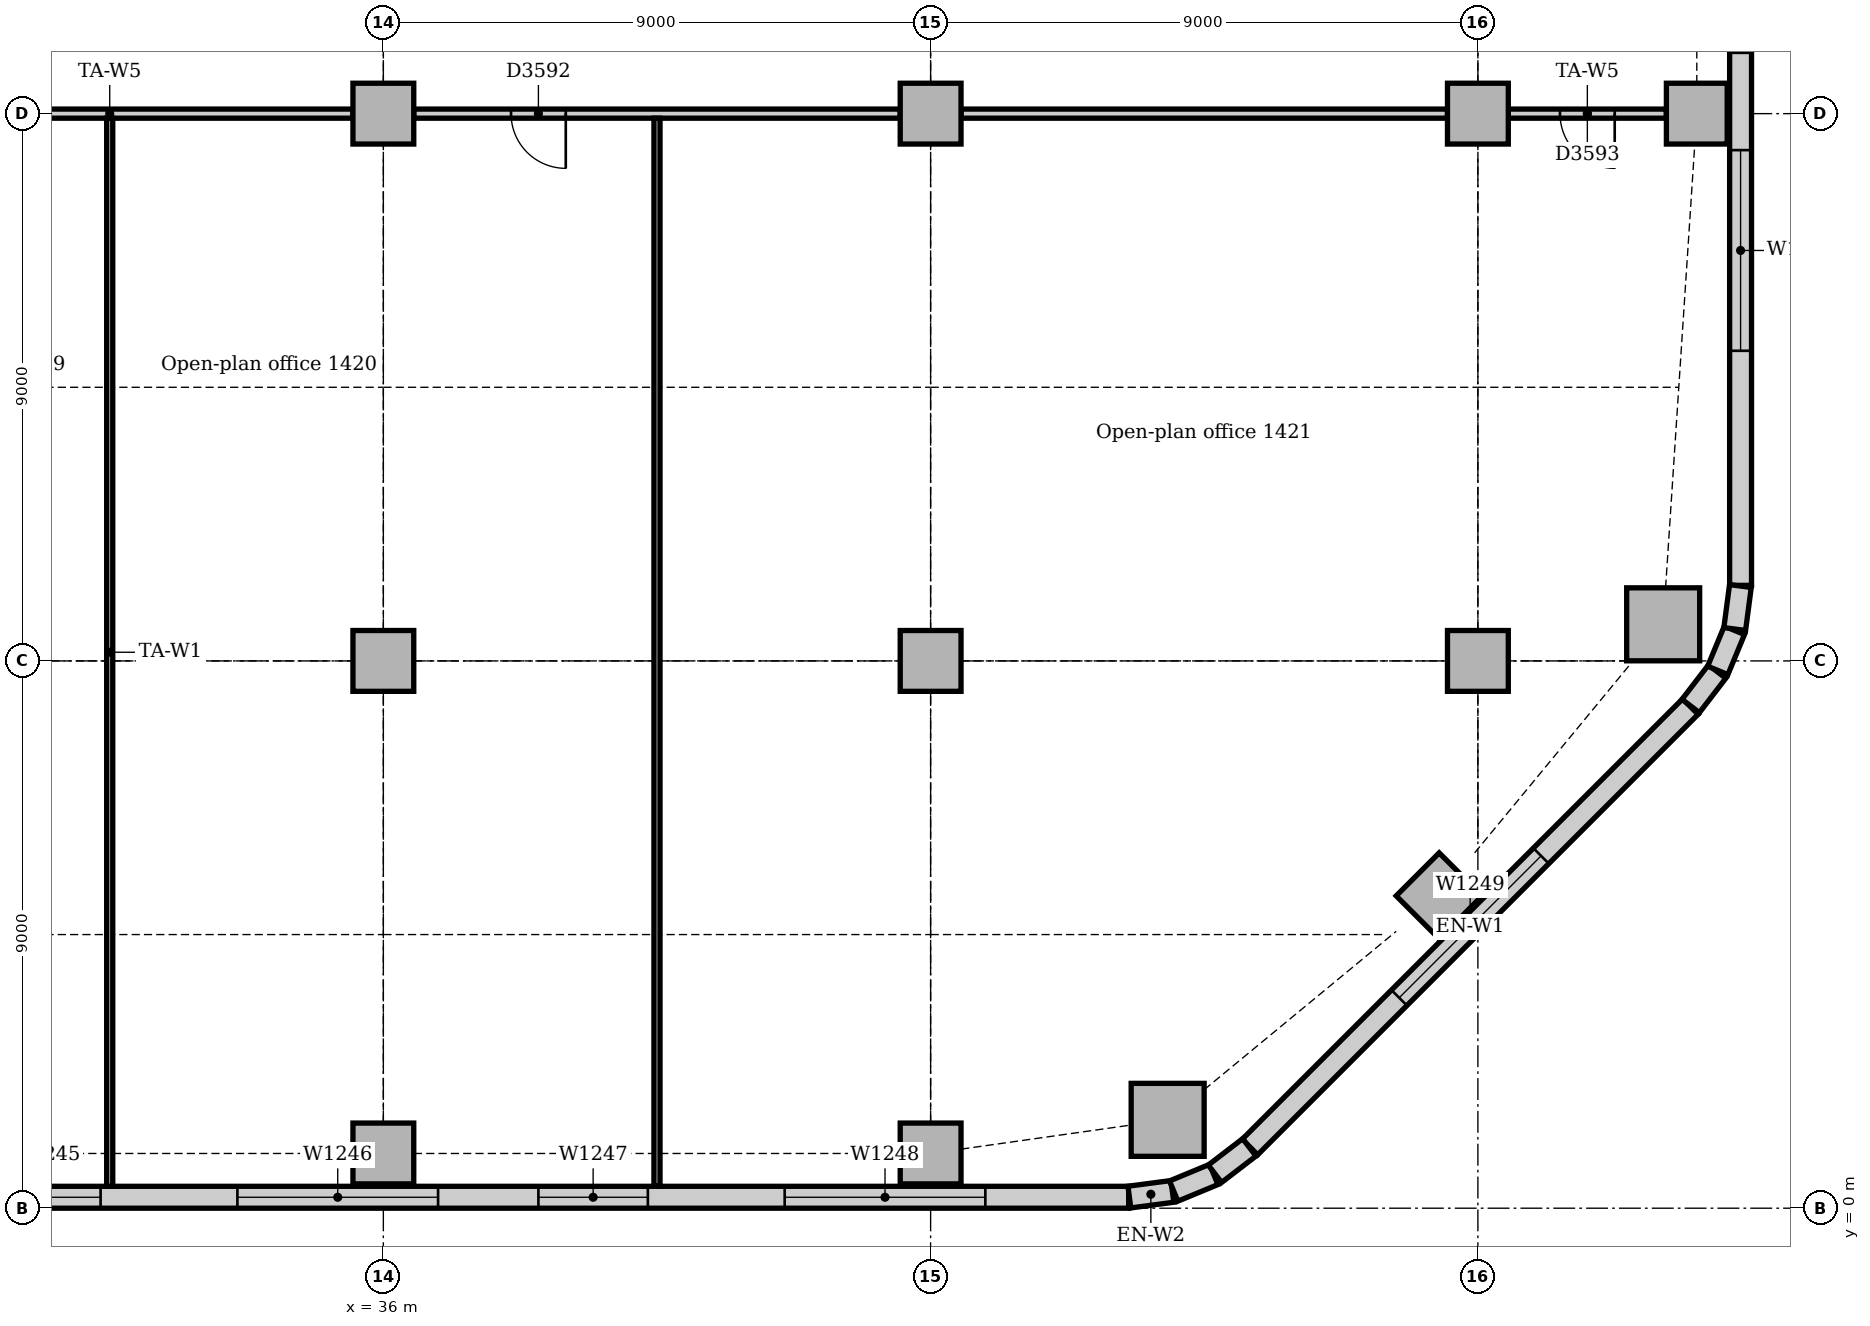
"""IFC4 building model, lengths in metres.
Left out: names, types, materials, properties, quantities, classifications, styles, units other than length and angle.
Written with IfcOpenShell. Run it as: python <this file> out.ifc"""

import sys

from ifc_helpers import new_model, si_unit, direction, frame, frame_2d, origin, origin_2d, place, context, subcontext, project, spatial, rectangle, extrude, element, fill, save


model = new_model("IFC4")
c1 = context("Model", 3, precision=1e-05, world=origin(), true_north=direction((0.0, 1.0)))
c2 = subcontext(c1, "Body", "Model", "MODEL_VIEW")
j1 = project(units=[si_unit("LENGTHUNIT", "METRE"), si_unit("PLANEANGLEUNIT", "RADIAN")], contexts=[c1])
p1 = place(None, origin())
s1 = spatial("IfcSite", under=j1, at=p1, CompositionType="ELEMENT")
p2 = place(p1, origin())
s2 = spatial("IfcBuilding", under=s1, at=p2, CompositionType="ELEMENT")
p3 = place(p2, frame((0.0, 0.0, 63.0)))
s3 = spatial("IfcBuildingStorey", under=s2, at=p3, CompositionType="ELEMENT", Elevation=63.0)
for number, where, z_axis, x_axis in (
    (1, (48.898, 1.453, 0.0), (0.0, 0.0, 1.0), (1.0, 0.0, 0.0)),
    (2, (57.047, 9.602, 0.0), (0.0, 0.0, 1.0), (1.0, 0.0, 0.0)),
):
    element("IfcColumn", number, at=place(p3, frame(where, z_axis=z_axis, x_axis=x_axis)), inside=s3, PredefinedType="COLUMN", context=c2, shape_type="SweptSolid", body=[
        extrude(rectangle(XDim=1.2, YDim=1.2, at=origin_2d()), origin(), (0.0, 0.0, 1.0), 3.85),
    ])
for number, where, z_axis, x_axis in (
    (3, (36.0, 0.9, 0.0), (0.0, 0.0, 1.0), (1.0, 0.0, 0.0)),
    (4, (45.0, 0.9, 0.0), (0.0, 0.0, 1.0), (1.0, 0.0, 0.0)),
    (5, (53.364, 5.136, 0.0), (0.0, 0.0, 1.0), (0.707, 0.707, 0.0)),
    (6, (57.6, 18.0, 0.0), (0.0, 0.0, 1.0), (1.0, 0.0, 0.0)),
    (7, (36.0, 9.0, 0.0), (0.0, 0.0, 1.0), (1.0, 0.0, 0.0)),
    (8, (36.0, 18.0, 0.0), (0.0, 0.0, 1.0), (1.0, 0.0, 0.0)),
    (9, (45.0, 9.0, 0.0), (0.0, 0.0, 1.0), (1.0, 0.0, 0.0)),
    (10, (45.0, 18.0, 0.0), (0.0, 0.0, 1.0), (1.0, 0.0, 0.0)),
    (11, (54.0, 9.0, 0.0), (0.0, 0.0, 1.0), (1.0, 0.0, 0.0)),
    (12, (54.0, 18.0, 0.0), (0.0, 0.0, 1.0), (1.0, 0.0, 0.0)),
):
    element("IfcColumn", number, at=place(p3, frame(where, z_axis=z_axis, x_axis=x_axis)), inside=s3, PredefinedType="COLUMN", context=c2, shape_type="SweptSolid", body=[
        extrude(rectangle(XDim=1.0, YDim=1.0, at=origin_2d()), origin(), (0.0, 0.0, 1.0), 3.85),
    ])
p4 = place(p3, frame((4.243, 0.18, 0.0), z_axis=(0.0, 0.0, 1.0), x_axis=(1.0, 0.0, 0.0)))
e13 = element("IfcWall", 13, at=p4, inside=s3, PredefinedType="STANDARD", context=c2, shape_type="SweptSolid", body=[
    extrude(rectangle(XDim=44.015, YDim=0.36, at=frame_2d((22.007, 0.0))), origin(), (0.0, 0.0, 1.0), 3.85),
])
p5 = place(p4, frame((2.357, 0.0, 0.9)))
e14 = element("IfcOpeningElement", 14, at=p5, cuts=e13, PredefinedType="OPENING", context=c2, shape_type="SweptSolid", body=[
    extrude(rectangle(XDim=3.3, YDim=1.6, at=frame_2d((1.65, 0.8))), frame((0.0, 0.19, 0.0), z_axis=(0.0, -1.0, 0.0), x_axis=(1.0, 0.0, 0.0)), (0.0, 0.0, 1.0), 0.38),
])
p6 = place(p4, frame((7.307, 0.0, 0.9)))
e15 = element("IfcOpeningElement", 15, at=p6, cuts=e13, PredefinedType="OPENING", context=c2, shape_type="SweptSolid", body=[
    extrude(rectangle(XDim=1.8, YDim=1.6, at=frame_2d((0.9, 0.8))), frame((0.0, 0.19, 0.0), z_axis=(0.0, -1.0, 0.0), x_axis=(1.0, 0.0, 0.0)), (0.0, 0.0, 1.0), 0.38),
])
p7 = place(p4, frame((11.357, 0.0, 0.9)))
e16 = element("IfcOpeningElement", 16, at=p7, cuts=e13, PredefinedType="OPENING", context=c2, shape_type="SweptSolid", body=[
    extrude(rectangle(XDim=3.3, YDim=1.6, at=frame_2d((1.65, 0.8))), frame((0.0, 0.19, 0.0), z_axis=(0.0, -1.0, 0.0), x_axis=(1.0, 0.0, 0.0)), (0.0, 0.0, 1.0), 0.38),
])
p8 = place(p4, frame((16.307, 0.0, 0.9)))
e17 = element("IfcOpeningElement", 17, at=p8, cuts=e13, PredefinedType="OPENING", context=c2, shape_type="SweptSolid", body=[
    extrude(rectangle(XDim=1.8, YDim=1.6, at=frame_2d((0.9, 0.8))), frame((0.0, 0.19, 0.0), z_axis=(0.0, -1.0, 0.0), x_axis=(1.0, 0.0, 0.0)), (0.0, 0.0, 1.0), 0.38),
])
p9 = place(p4, frame((20.357, 0.0, 0.9)))
e18 = element("IfcOpeningElement", 18, at=p9, cuts=e13, PredefinedType="OPENING", context=c2, shape_type="SweptSolid", body=[
    extrude(rectangle(XDim=3.3, YDim=1.6, at=frame_2d((1.65, 0.8))), frame((0.0, 0.19, 0.0), z_axis=(0.0, -1.0, 0.0), x_axis=(1.0, 0.0, 0.0)), (0.0, 0.0, 1.0), 0.38),
])
p10 = place(p4, frame((25.307, 0.0, 0.9)))
e19 = element("IfcOpeningElement", 19, at=p10, cuts=e13, PredefinedType="OPENING", context=c2, shape_type="SweptSolid", body=[
    extrude(rectangle(XDim=1.8, YDim=1.6, at=frame_2d((0.9, 0.8))), frame((0.0, 0.19, 0.0), z_axis=(0.0, -1.0, 0.0), x_axis=(1.0, 0.0, 0.0)), (0.0, 0.0, 1.0), 0.38),
])
p11 = place(p4, frame((29.357, 0.0, 0.9)))
e20 = element("IfcOpeningElement", 20, at=p11, cuts=e13, PredefinedType="OPENING", context=c2, shape_type="SweptSolid", body=[
    extrude(rectangle(XDim=3.3, YDim=1.6, at=frame_2d((1.65, 0.8))), frame((0.0, 0.19, 0.0), z_axis=(0.0, -1.0, 0.0), x_axis=(1.0, 0.0, 0.0)), (0.0, 0.0, 1.0), 0.38),
])
p12 = place(p4, frame((34.307, 0.0, 0.9)))
e21 = element("IfcOpeningElement", 21, at=p12, cuts=e13, PredefinedType="OPENING", context=c2, shape_type="SweptSolid", body=[
    extrude(rectangle(XDim=1.8, YDim=1.6, at=frame_2d((0.9, 0.8))), frame((0.0, 0.19, 0.0), z_axis=(0.0, -1.0, 0.0), x_axis=(1.0, 0.0, 0.0)), (0.0, 0.0, 1.0), 0.38),
])
p13 = place(p4, frame((38.357, 0.0, 0.9)))
e22 = element("IfcOpeningElement", 22, at=p13, cuts=e13, PredefinedType="OPENING", context=c2, shape_type="SweptSolid", body=[
    extrude(rectangle(XDim=3.3, YDim=1.6, at=frame_2d((1.65, 0.8))), frame((0.0, 0.19, 0.0), z_axis=(0.0, -1.0, 0.0), x_axis=(1.0, 0.0, 0.0)), (0.0, 0.0, 1.0), 0.38),
])
p14 = place(p3, frame((50.251, 1.006, 0.0), z_axis=(0.0, 0.0, 1.0), x_axis=(0.707106781187, 0.707106781187, 0.0)))
e23 = element("IfcWall", 23, at=p14, inside=s3, PredefinedType="STANDARD", context=c2, shape_type="SweptSolid", body=[
    extrude(rectangle(XDim=10.243, YDim=0.36, at=frame_2d((5.121, 0.0))), origin(), (0.0, 0.0, 1.0), 3.85),
])
p15 = place(p14, frame((3.471, 0.0, 0.9)))
e24 = element("IfcOpeningElement", 24, at=p15, cuts=e23, PredefinedType="OPENING", context=c2, shape_type="SweptSolid", body=[
    extrude(rectangle(XDim=3.3, YDim=1.6, at=frame_2d((1.65, 0.8))), frame((0.0, 0.19, 0.0), z_axis=(0.0, -1.0, 0.0), x_axis=(1.0, 0.0, 0.0)), (0.0, 0.0, 1.0), 0.38),
])
p16 = place(p3, frame((58.32, 10.243, 0.0), z_axis=(0.0, 0.0, 1.0), x_axis=(0.0, 1.0, 0.0)))
e25 = element("IfcWall", 25, at=p16, inside=s3, PredefinedType="STANDARD", context=c2, shape_type="SweptSolid", body=[
    extrude(rectangle(XDim=24.515, YDim=0.36, at=frame_2d((12.257, 0.0))), origin(), (0.0, 0.0, 1.0), 3.85),
])
p17 = place(p16, frame((3.857, 0.0, 0.9)))
e26 = element("IfcOpeningElement", 26, at=p17, cuts=e25, PredefinedType="OPENING", context=c2, shape_type="SweptSolid", body=[
    extrude(rectangle(XDim=3.3, YDim=1.6, at=frame_2d((1.65, 0.8))), frame((0.0, 0.19, 0.0), z_axis=(0.0, -1.0, 0.0), x_axis=(1.0, 0.0, 0.0)), (0.0, 0.0, 1.0), 0.38),
])
p18 = place(p16, frame((8.757, 0.0, 0.9)))
e27 = element("IfcOpeningElement", 27, at=p18, cuts=e25, PredefinedType="OPENING", context=c2, shape_type="SweptSolid", body=[
    extrude(rectangle(XDim=1.8, YDim=1.6, at=frame_2d((0.9, 0.8))), frame((0.0, 0.19, 0.0), z_axis=(0.0, -1.0, 0.0), x_axis=(1.0, 0.0, 0.0)), (0.0, 0.0, 1.0), 0.38),
])
p19 = place(p16, frame((12.857, 0.0, 0.9)))
e28 = element("IfcOpeningElement", 28, at=p19, cuts=e25, PredefinedType="OPENING", context=c2, shape_type="SweptSolid", body=[
    extrude(rectangle(XDim=3.3, YDim=1.6, at=frame_2d((1.65, 0.8))), frame((0.0, 0.19, 0.0), z_axis=(0.0, -1.0, 0.0), x_axis=(1.0, 0.0, 0.0)), (0.0, 0.0, 1.0), 0.38),
])
p20 = place(p16, frame((17.357, 0.0, 0.9)))
e29 = element("IfcOpeningElement", 29, at=p20, cuts=e25, PredefinedType="OPENING", context=c2, shape_type="SweptSolid", body=[
    extrude(rectangle(XDim=3.3, YDim=1.6, at=frame_2d((1.65, 0.8))), frame((0.0, 0.19, 0.0), z_axis=(0.0, -1.0, 0.0), x_axis=(1.0, 0.0, 0.0)), (0.0, 0.0, 1.0), 0.38),
])
for number, where, z_axis, x_axis in (
    (30, (48.269, 0.183, 0.0), (0.0, 0.0, 1.0), (0.991, 0.131, 0.0)),
    (31, (48.997, 0.282, 0.0), (0.0, 0.0, 1.0), (0.924, 0.383, 0.0)),
):
    element("IfcWall", number, at=place(p3, frame(where, z_axis=z_axis, x_axis=x_axis)), inside=s3, PredefinedType="STANDARD", context=c2, shape_type="SweptSolid", body=[
        extrude(rectangle(XDim=0.713, YDim=0.36, at=frame_2d((0.356, 0.0))), origin(), (0.0, 0.0, 1.0), 3.85),
    ])
for number, where, z_axis, x_axis in (
    (32, (49.675, 0.566, 0.0), (0.0, 0.0, 1.0), (0.793, 0.609, 0.0)),
    (33, (57.5, 8.259, 0.0), (0.0, 0.0, 1.0), (0.609, 0.793, 0.0)),
):
    element("IfcWall", number, at=place(p3, frame(where, z_axis=z_axis, x_axis=x_axis)), inside=s3, PredefinedType="STANDARD", context=c2, shape_type="SweptSolid", body=[
        extrude(rectangle(XDim=0.713, YDim=0.36, at=frame_2d((0.357, 0.0))), origin(), (0.0, 0.0, 1.0), 3.85),
    ])
for number, where, z_axis, x_axis in (
    (34, (57.945, 8.844, 0.0), (0.0, 0.0, 1.0), (0.383, 0.924, 0.0)),
    (35, (58.224, 9.524, 0.0), (0.0, 0.0, 1.0), (0.131, 0.991, 0.0)),
):
    element("IfcWall", number, at=place(p3, frame(where, z_axis=z_axis, x_axis=x_axis)), inside=s3, PredefinedType="STANDARD", context=c2, shape_type="SweptSolid", body=[
        extrude(rectangle(XDim=0.713, YDim=0.36, at=frame_2d((0.356, 0.0))), origin(), (0.0, 0.0, 1.0), 3.85),
    ])
p21 = place(p3, frame((54.5, 18.0, 0.0), z_axis=(0.0, 0.0, 1.0), x_axis=(1.0, 0.0, 0.0)))
e36 = element("IfcWall", 36, at=p21, inside=s3, PredefinedType="PARTITIONING", context=c2, shape_type="SweptSolid", body=[
    extrude(rectangle(XDim=2.6, YDim=0.15, at=frame_2d((1.3, 0.0))), origin(), (0.0, 0.0, 1.0), 3.602),
])
p22 = place(p21, frame((0.85, 0.0, 0.0)))
e37 = element("IfcOpeningElement", 37, at=p22, cuts=e36, PredefinedType="OPENING", context=c2, shape_type="SweptSolid", body=[
    extrude(rectangle(XDim=0.9, YDim=2.1, at=frame_2d((0.45, 1.05))), frame((0.0, 0.085, 0.0), z_axis=(0.0, -1.0, 0.0), x_axis=(1.0, 0.0, 0.0)), (0.0, 0.0, 1.0), 0.17),
])
p23 = place(p3, frame((45.5, 18.0, 0.0), z_axis=(0.0, 0.0, 1.0), x_axis=(1.0, 0.0, 0.0)))
e38 = element("IfcWall", 38, at=p23, inside=s3, PredefinedType="PARTITIONING", context=c2, shape_type="SweptSolid", body=[
    extrude(rectangle(XDim=8.0, YDim=0.15, at=frame_2d((4.0, 0.0))), origin(), (0.0, 0.0, 1.0), 3.15),
])
p24 = place(p3, frame((36.5, 18.0, 0.0), z_axis=(0.0, 0.0, 1.0), x_axis=(1.0, 0.0, 0.0)))
e39 = element("IfcWall", 39, at=p24, inside=s3, PredefinedType="PARTITIONING", context=c2, shape_type="SweptSolid", body=[
    extrude(rectangle(XDim=8.0, YDim=0.15, at=frame_2d((4.0, 0.0))), origin(), (0.0, 0.0, 1.0), 3.15),
])
p25 = place(p24, frame((1.6, 0.0, 0.0)))
e40 = element("IfcOpeningElement", 40, at=p25, cuts=e39, PredefinedType="OPENING", context=c2, shape_type="SweptSolid", body=[
    extrude(rectangle(XDim=0.9, YDim=2.1, at=frame_2d((0.45, 1.05))), frame((0.0, 0.085, 0.0), z_axis=(0.0, -1.0, 0.0), x_axis=(1.0, 0.0, 0.0)), (0.0, 0.0, 1.0), 0.17),
])
p26 = place(p3, frame((27.5, 18.0, 0.0), z_axis=(0.0, 0.0, 1.0), x_axis=(1.0, 0.0, 0.0)))
e41 = element("IfcWall", 41, at=p26, inside=s3, PredefinedType="PARTITIONING", context=c2, shape_type="SweptSolid", body=[
    extrude(rectangle(XDim=8.0, YDim=0.15, at=frame_2d((4.0, 0.0))), origin(), (0.0, 0.0, 1.0), 3.15),
])
p27 = place(p26, frame((1.6, 0.0, 0.0)))
e42 = element("IfcOpeningElement", 42, at=p27, cuts=e41, PredefinedType="OPENING", context=c2, shape_type="SweptSolid", body=[
    extrude(rectangle(XDim=0.9, YDim=2.1, at=frame_2d((0.45, 1.05))), frame((0.0, 0.085, 0.0), z_axis=(0.0, -1.0, 0.0), x_axis=(1.0, 0.0, 0.0)), (0.0, 0.0, 1.0), 0.17),
])
for number, where, z_axis, x_axis in (
    (43, (31.5, 0.36, 0.0), (0.0, 0.0, 1.0), (0.0, 1.0, 0.0)),
    (44, (40.5, 0.36, 0.0), (0.0, 0.0, 1.0), (0.0, 1.0, 0.0)),
):
    element("IfcWall", number, at=place(p3, frame(where, z_axis=z_axis, x_axis=x_axis)), inside=s3, PredefinedType="PARTITIONING", context=c2, shape_type="SweptSolid", body=[
        extrude(rectangle(XDim=17.565, YDim=0.1, at=frame_2d((8.783, 0.0))), origin(), (0.0, 0.0, 1.0), 3.85),
    ])
p28 = place(p10, origin())
e45 = element("IfcWindow", 45, at=p28, inside=s3, PartitioningType="SINGLE_PANEL", PredefinedType="WINDOW", context=c2, shape_type="SweptSolid", body=[
    extrude(rectangle(XDim=1.8, YDim=1.6, at=frame_2d((0.9, 0.8))), frame((0.0, 0.13, 0.0), z_axis=(0.0, -1.0, 0.0), x_axis=(1.0, 0.0, 0.0)), (0.0, 0.0, 1.0), 0.06),
])
fill(e19, e45)
p29 = place(p11, origin())
e46 = element("IfcWindow", 46, at=p29, inside=s3, PartitioningType="SINGLE_PANEL", PredefinedType="WINDOW", context=c2, shape_type="SweptSolid", body=[
    extrude(rectangle(XDim=3.3, YDim=1.6, at=frame_2d((1.65, 0.8))), frame((0.0, 0.13, 0.0), z_axis=(0.0, -1.0, 0.0), x_axis=(1.0, 0.0, 0.0)), (0.0, 0.0, 1.0), 0.06),
])
fill(e20, e46)
p30 = place(p12, origin())
e47 = element("IfcWindow", 47, at=p30, inside=s3, PartitioningType="SINGLE_PANEL", PredefinedType="WINDOW", context=c2, shape_type="SweptSolid", body=[
    extrude(rectangle(XDim=1.8, YDim=1.6, at=frame_2d((0.9, 0.8))), frame((0.0, 0.13, 0.0), z_axis=(0.0, -1.0, 0.0), x_axis=(1.0, 0.0, 0.0)), (0.0, 0.0, 1.0), 0.06),
])
fill(e21, e47)
p31 = place(p13, origin())
e48 = element("IfcWindow", 48, at=p31, inside=s3, PartitioningType="SINGLE_PANEL", PredefinedType="WINDOW", context=c2, shape_type="SweptSolid", body=[
    extrude(rectangle(XDim=3.3, YDim=1.6, at=frame_2d((1.65, 0.8))), frame((0.0, 0.13, 0.0), z_axis=(0.0, -1.0, 0.0), x_axis=(1.0, 0.0, 0.0)), (0.0, 0.0, 1.0), 0.06),
])
fill(e22, e48)
p32 = place(p15, origin())
e49 = element("IfcWindow", 49, at=p32, inside=s3, PartitioningType="SINGLE_PANEL", PredefinedType="WINDOW", context=c2, shape_type="SweptSolid", body=[
    extrude(rectangle(XDim=3.3, YDim=1.6, at=frame_2d((1.65, 0.8))), frame((0.0, 0.13, 0.0), z_axis=(0.0, -1.0, 0.0), x_axis=(1.0, 0.0, 0.0)), (0.0, 0.0, 1.0), 0.06),
])
fill(e24, e49)
p33 = place(p17, origin())
e50 = element("IfcWindow", 50, at=p33, inside=s3, PartitioningType="SINGLE_PANEL", PredefinedType="WINDOW", context=c2, shape_type="SweptSolid", body=[
    extrude(rectangle(XDim=3.3, YDim=1.6, at=frame_2d((1.65, 0.8))), frame((0.0, 0.13, 0.0), z_axis=(0.0, -1.0, 0.0), x_axis=(1.0, 0.0, 0.0)), (0.0, 0.0, 1.0), 0.06),
])
fill(e26, e50)
p34 = place(p25, frame((0.9, 0.0, 0.0), z_axis=(0.0, 0.0, 1.0), x_axis=(-1.0, 0.0, 0.0)))
e51 = element("IfcDoor", 51, at=p34, inside=s3, OperationType="SINGLE_SWING_LEFT", PredefinedType="DOOR", context=c2, shape_type="SweptSolid", body=[
    extrude(rectangle(XDim=0.9, YDim=2.1, at=frame_2d((0.45, 1.05))), frame((0.0, 0.025, 0.0), z_axis=(0.0, -1.0, 0.0), x_axis=(1.0, 0.0, 0.0)), (0.0, 0.0, 1.0), 0.05),
])
fill(e40, e51)
p35 = place(p22, frame((0.9, 0.0, 0.0), z_axis=(0.0, 0.0, 1.0), x_axis=(-1.0, 0.0, 0.0)))
e52 = element("IfcDoor", 52, at=p35, inside=s3, OperationType="SINGLE_SWING_LEFT", PredefinedType="DOOR", context=c2, shape_type="SweptSolid", body=[
    extrude(rectangle(XDim=0.9, YDim=2.1, at=frame_2d((0.45, 1.05))), frame((0.0, 0.025, 0.0), z_axis=(0.0, -1.0, 0.0), x_axis=(1.0, 0.0, 0.0)), (0.0, 0.0, 1.0), 0.05),
])
fill(e37, e52)
save(model, sys.argv[1])
